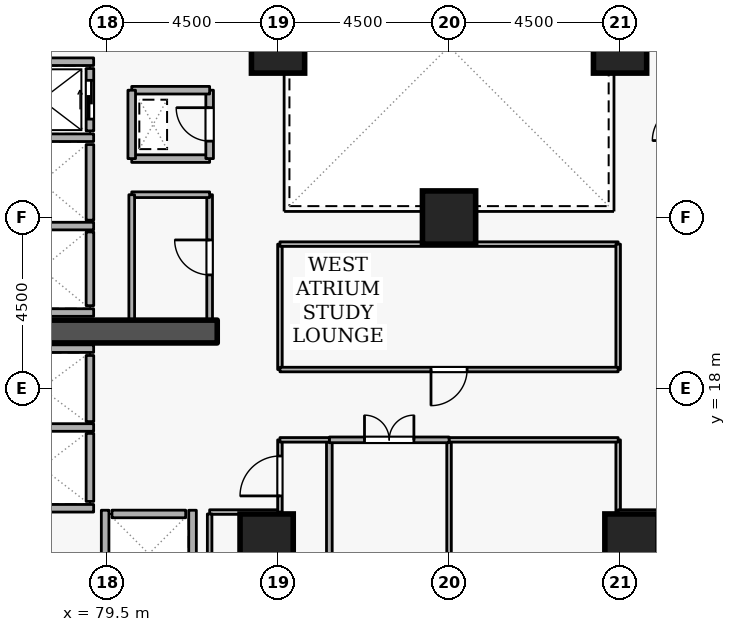
"""IFC4 building model, lengths in metres.
Left out: names, types, materials, properties, quantities, classifications, styles, units other than length and angle.
Written with IfcOpenShell. Run it as: python <this file> out.ifc"""

import sys

from ifc_helpers import new_model, si_unit, direction, frame, frame_2d, origin, origin_2d, place, context, subcontext, project, spatial, rectangle, extrude, element, fill, save


model = new_model("IFC4")
c1 = context("Model", 3, precision=1e-05, world=origin(), true_north=direction((0.0, 1.0)))
c2 = subcontext(c1, "Body", "Model", "MODEL_VIEW")
j1 = project(units=[si_unit("LENGTHUNIT", "METRE"), si_unit("PLANEANGLEUNIT", "RADIAN")], contexts=[c1])
p1 = place(None, origin())
s1 = spatial("IfcSite", under=j1, at=p1, CompositionType="ELEMENT")
p2 = place(p1, origin())
s2 = spatial("IfcBuilding", under=s1, at=p2, CompositionType="ELEMENT")
p3 = place(p2, frame((0.0, 0.0, 42.3)))
s3 = spatial("IfcBuildingStorey", under=s2, at=p3, CompositionType="ELEMENT", Elevation=42.3)
p4 = place(p3, frame((76.7, 19.5, 0.0), z_axis=(0.0, 0.0, 1.0), x_axis=(1.0, 0.0, 0.0)))
e1 = element("IfcWall", 1, at=p4, inside=s3, PredefinedType="SHEAR", context=c2, shape_type="SweptSolid", body=[
    extrude(rectangle(XDim=5.7, YDim=0.6, at=frame_2d((2.85, 0.0))), origin(), (0.0, 0.0, 1.0), 3.6),
])
for number, where, z_axis, x_axis in (
    (2, (93.3, 14.0, 0.0), (0.0, 0.0, 1.0), (1.0, 0.0, 0.0)),
    (3, (83.7, 14.0, 0.0), (0.0, 0.0, 1.0), (1.0, 0.0, 0.0)),
    (4, (93.0, 27.0, 0.0), (0.0, 0.0, 1.0), (1.0, 0.0, 0.0)),
    (5, (84.0, 27.0, 0.0), (0.0, 0.0, 1.0), (1.0, 0.0, 0.0)),
    (6, (88.5, 22.5, 0.0), (0.0, 0.0, 1.0), (1.0, 0.0, 0.0)),
):
    element("IfcColumn", number, at=place(p3, frame(where, z_axis=z_axis, x_axis=x_axis)), inside=s3, PredefinedType="COLUMN", context=c2, shape_type="SweptSolid", body=[
        extrude(rectangle(XDim=1.4, YDim=1.4, at=origin_2d()), origin(), (0.0, 0.0, 1.0), 3.6),
    ])
p5 = place(p3, frame((79.05, 24.78, 0.0), z_axis=(0.0, 0.0, 1.0), x_axis=(0.0, 1.0, 0.0)))
e7 = element("IfcWall", 7, at=p5, inside=s3, PredefinedType="STANDARD", context=c2, shape_type="SweptSolid", body=[
    extrude(rectangle(XDim=1.64, YDim=0.2, at=frame_2d((0.82, 0.0))), origin(), (0.0, 0.0, 1.0), 3.34),
])
p6 = place(p5, frame((0.31, 0.0, 0.0)))
e8 = element("IfcOpeningElement", 8, at=p6, cuts=e7, PredefinedType="OPENING", context=c2, shape_type="SweptSolid", body=[
    extrude(rectangle(XDim=1.02, YDim=2.06, at=frame_2d((0.51, 1.03))), frame((0.0, 0.11, 0.0), z_axis=(0.0, -1.0, 0.0), x_axis=(1.0, 0.0, 0.0)), (0.0, 0.0, 1.0), 0.22),
])
p7 = place(p3, frame((79.05, 22.43, 0.0), z_axis=(0.0, 0.0, 1.0), x_axis=(0.0, 1.0, 0.0)))
e9 = element("IfcWall", 9, at=p7, inside=s3, PredefinedType="STANDARD", context=c2, shape_type="SweptSolid", body=[
    extrude(rectangle(XDim=1.99, YDim=0.2, at=frame_2d((0.995, 0.0))), origin(), (0.0, 0.0, 1.0), 3.34),
])
p8 = place(p3, frame((79.05, 20.18, 0.0), z_axis=(0.0, 0.0, 1.0), x_axis=(0.0, 1.0, 0.0)))
e10 = element("IfcWall", 10, at=p8, inside=s3, PredefinedType="STANDARD", context=c2, shape_type="SweptSolid", body=[
    extrude(rectangle(XDim=1.94, YDim=0.2, at=frame_2d((0.97, 0.0))), origin(), (0.0, 0.0, 1.0), 3.34),
])
p9 = place(p3, frame((79.05, 17.13, 0.0), z_axis=(0.0, 0.0, 1.0), x_axis=(0.0, 1.0, 0.0)))
e11 = element("IfcWall", 11, at=p9, inside=s3, PredefinedType="STANDARD", context=c2, shape_type="SweptSolid", body=[
    extrude(rectangle(XDim=1.74, YDim=0.2, at=frame_2d((0.87, 0.0))), origin(), (0.0, 0.0, 1.0), 3.34),
])
p10 = place(p3, frame((79.05, 15.03, 0.0), z_axis=(0.0, 0.0, 1.0), x_axis=(0.0, 1.0, 0.0)))
e12 = element("IfcWall", 12, at=p10, inside=s3, PredefinedType="STANDARD", context=c2, shape_type="SweptSolid", body=[
    extrude(rectangle(XDim=1.79, YDim=0.2, at=frame_2d((0.895, 0.0))), origin(), (0.0, 0.0, 1.0), 3.34),
])
p11 = place(p3, frame((79.63, 14.7, 0.0), z_axis=(0.0, 0.0, 1.0), x_axis=(1.0, 0.0, 0.0)))
e13 = element("IfcWall", 13, at=p11, inside=s3, PredefinedType="STANDARD", context=c2, shape_type="SweptSolid", body=[
    extrude(rectangle(XDim=1.94, YDim=0.2, at=frame_2d((0.97, 0.0))), origin(), (0.0, 0.0, 1.0), 3.34),
])
for number, where, z_axis, x_axis in (
    (14, (76.712, 26.6, 0.0), (0.0, 0.0, 1.0), (1.0, 0.0, 0.0)),
    (15, (76.712, 24.6, 0.0), (0.0, 0.0, 1.0), (1.0, 0.0, 0.0)),
    (16, (76.712, 22.275, 0.0), (0.0, 0.0, 1.0), (1.0, 0.0, 0.0)),
    (17, (76.712, 20.0, 0.0), (0.0, 0.0, 1.0), (1.0, 0.0, 0.0)),
):
    element("IfcWall", number, at=place(p3, frame(where, z_axis=z_axis, x_axis=x_axis)), inside=s3, PredefinedType="STANDARD", context=c2, shape_type="SweptSolid", body=[
        extrude(rectangle(XDim=2.436, YDim=0.2, at=frame_2d((1.218, 0.0))), origin(), (0.0, 0.0, 1.0), 3.34),
    ])
p12 = place(p3, frame((76.402, 19.05, 0.0), z_axis=(0.0, 0.0, 1.0), x_axis=(1.0, 0.0, 0.0)))
e18 = element("IfcWall", 18, at=p12, inside=s3, PredefinedType="STANDARD", context=c2, shape_type="SweptSolid", body=[
    extrude(rectangle(XDim=2.746, YDim=0.2, at=frame_2d((1.373, 0.0))), origin(), (0.0, 0.0, 1.0), 2.545),
])
p13 = place(p3, frame((76.402, 16.975, 0.0), z_axis=(0.0, 0.0, 1.0), x_axis=(1.0, 0.0, 0.0)))
e19 = element("IfcWall", 19, at=p13, inside=s3, PredefinedType="STANDARD", context=c2, shape_type="SweptSolid", body=[
    extrude(rectangle(XDim=2.746, YDim=0.2, at=frame_2d((1.373, 0.0))), origin(), (0.0, 0.0, 1.0), 3.34),
])
p14 = place(p3, frame((76.512, 14.85, 0.0), z_axis=(0.0, 0.0, 1.0), x_axis=(1.0, 0.0, 0.0)))
e20 = element("IfcWall", 20, at=p14, inside=s3, PredefinedType="STANDARD", context=c2, shape_type="SweptSolid", body=[
    extrude(rectangle(XDim=2.636, YDim=0.2, at=frame_2d((1.318, 0.0))), origin(), (0.0, 0.0, 1.0), 3.34),
])
for number, where, z_axis, x_axis in (
    (21, (81.75, 12.612, 0.0), (0.0, 0.0, 1.0), (0.0, 1.0, 0.0)),
    (22, (79.45, 12.612, 0.0), (0.0, 0.0, 1.0), (0.0, 1.0, 0.0)),
):
    element("IfcWall", number, at=place(p3, frame(where, z_axis=z_axis, x_axis=x_axis)), inside=s3, PredefinedType="STANDARD", context=c2, shape_type="SweptSolid", body=[
        extrude(rectangle(XDim=2.186, YDim=0.2, at=frame_2d((1.093, 0.0))), origin(), (0.0, 0.0, 1.0), 3.34),
    ])
p15 = place(p3, frame((80.15, 24.05, 0.0), z_axis=(0.0, 0.0, 1.0), x_axis=(1.0, 0.0, 0.0)))
e23 = element("IfcWall", 23, at=p15, inside=s3, PredefinedType="STANDARD", context=c2, shape_type="SweptSolid", body=[
    extrude(rectangle(XDim=2.05, YDim=0.2, at=frame_2d((1.025, 0.0))), origin(), (0.0, 0.0, 1.0), 3.34),
])
p16 = place(p3, frame((82.2, 24.05, 0.0), z_axis=(0.0, 0.0, 1.0), x_axis=(0.0, 1.0, 0.0)))
e24 = element("IfcWall", 24, at=p16, inside=s3, PredefinedType="STANDARD", context=c2, shape_type="SweptSolid", body=[
    extrude(rectangle(XDim=1.8, YDim=0.2, at=frame_2d((0.9, 0.0))), origin(), (0.0, 0.0, 1.0), 3.34),
])
p17 = place(p16, frame((0.46, 0.0, 0.0)))
e25 = element("IfcOpeningElement", 25, at=p17, cuts=e24, PredefinedType="OPENING", context=c2, shape_type="SweptSolid", body=[
    extrude(rectangle(XDim=0.88, YDim=2.04, at=frame_2d((0.44, 1.02))), frame((0.0, 0.11, 0.0), z_axis=(0.0, -1.0, 0.0), x_axis=(1.0, 0.0, 0.0)), (0.0, 0.0, 1.0), 0.22),
])
p18 = place(p3, frame((82.2, 25.85, 0.0), z_axis=(0.0, 0.0, 1.0), x_axis=(-1.0, 0.0, 0.0)))
e26 = element("IfcWall", 26, at=p18, inside=s3, PredefinedType="STANDARD", context=c2, shape_type="SweptSolid", body=[
    extrude(rectangle(XDim=2.05, YDim=0.2, at=frame_2d((1.025, 0.0))), origin(), (0.0, 0.0, 1.0), 3.34),
])
p19 = place(p3, frame((80.15, 25.85, 0.0), z_axis=(0.0, 0.0, 1.0), x_axis=(0.0, -1.0, 0.0)))
e27 = element("IfcWall", 27, at=p19, inside=s3, PredefinedType="STANDARD", context=c2, shape_type="SweptSolid", body=[
    extrude(rectangle(XDim=1.8, YDim=0.2, at=frame_2d((0.9, 0.0))), origin(), (0.0, 0.0, 1.0), 3.34),
])
p20 = place(p3, frame((82.2, 19.8, 0.0), z_axis=(0.0, 0.0, 1.0), x_axis=(0.0, 1.0, 0.0)))
e28 = element("IfcWall", 28, at=p20, inside=s3, PredefinedType="PARTITIONING", context=c2, shape_type="SweptSolid", body=[
    extrude(rectangle(XDim=3.3, YDim=0.15, at=frame_2d((1.65, 0.0))), origin(), (0.0, 0.0, 1.0), 3.34),
])
p21 = place(p20, frame((1.19, 0.0, 0.0)))
e29 = element("IfcOpeningElement", 29, at=p21, cuts=e28, PredefinedType="OPENING", context=c2, shape_type="SweptSolid", body=[
    extrude(rectangle(XDim=0.92, YDim=2.08, at=frame_2d((0.46, 1.04))), frame((0.0, 0.085, 0.0), z_axis=(0.0, -1.0, 0.0), x_axis=(1.0, 0.0, 0.0)), (0.0, 0.0, 1.0), 0.17),
])
p22 = place(p3, frame((82.2, 23.1, 0.0), z_axis=(0.0, 0.0, 1.0), x_axis=(-1.0, 0.0, 0.0)))
e30 = element("IfcWall", 30, at=p22, inside=s3, PredefinedType="PARTITIONING", context=c2, shape_type="SweptSolid", body=[
    extrude(rectangle(XDim=2.05, YDim=0.15, at=frame_2d((1.025, 0.0))), origin(), (0.0, 0.0, 1.0), 3.34),
])
p23 = place(p3, frame((80.15, 23.1, 0.0), z_axis=(0.0, 0.0, 1.0), x_axis=(0.0, -1.0, 0.0)))
e31 = element("IfcWall", 31, at=p23, inside=s3, PredefinedType="PARTITIONING", context=c2, shape_type="SweptSolid", body=[
    extrude(rectangle(XDim=3.3, YDim=0.15, at=frame_2d((1.65, 0.0))), origin(), (0.0, 0.0, 1.0), 3.34),
])
p24 = place(p3, frame((92.95, 16.65, 0.0), z_axis=(0.0, 0.0, 1.0), x_axis=(0.0, -1.0, 0.0)))
e32 = element("IfcWall", 32, at=p24, inside=s3, PredefinedType="PARTITIONING", context=c2, shape_type="SweptSolid", body=[
    extrude(rectangle(XDim=1.9, YDim=0.12, at=frame_2d((0.95, 0.0))), origin(), (0.0, 0.0, 1.0), 3.34),
])
p25 = place(p3, frame((92.95, 14.75, 0.0), z_axis=(0.0, 0.0, 1.0), x_axis=(1.0, 0.0, 0.0)))
e33 = element("IfcWall", 33, at=p25, inside=s3, PredefinedType="PARTITIONING", context=c2, shape_type="SweptSolid", body=[
    extrude(rectangle(XDim=1.85, YDim=0.12, at=frame_2d((0.925, 0.0))), origin(), (0.0, 0.0, 1.0), 3.34),
])
p26 = place(p3, frame((88.5, 2.78, 0.0), z_axis=(0.0, 0.0, 1.0), x_axis=(0.0, 1.0, 0.0)))
e34 = element("IfcWall", 34, at=p26, inside=s3, PredefinedType="PARTITIONING", context=c2, shape_type="SweptSolid", body=[
    extrude(rectangle(XDim=13.87, YDim=0.12, at=frame_2d((6.935, 0.0))), origin(), (0.0, 0.0, 1.0), 2.882),
])
p27 = place(p3, frame((88.5, 16.65, 0.0), z_axis=(0.0, 0.0, 1.0), x_axis=(1.0, 0.0, 0.0)))
e35 = element("IfcWall", 35, at=p27, inside=s3, PredefinedType="PARTITIONING", context=c2, shape_type="SweptSolid", body=[
    extrude(rectangle(XDim=4.45, YDim=0.12, at=frame_2d((2.225, 0.0))), origin(), (0.0, 0.0, 1.0), 3.34),
])
p28 = place(p3, frame((85.35, 2.78, 0.0), z_axis=(0.0, 0.0, 1.0), x_axis=(0.0, 1.0, 0.0)))
e36 = element("IfcWall", 36, at=p28, inside=s3, PredefinedType="PARTITIONING", context=c2, shape_type="SweptSolid", body=[
    extrude(rectangle(XDim=13.87, YDim=0.15, at=frame_2d((6.935, 0.0))), origin(), (0.0, 0.0, 1.0), 3.34),
])
p29 = place(p3, frame((85.35, 16.65, 0.0), z_axis=(0.0, 0.0, 1.0), x_axis=(1.0, 0.0, 0.0)))
e37 = element("IfcWall", 37, at=p29, inside=s3, PredefinedType="PARTITIONING", context=c2, shape_type="SweptSolid", body=[
    extrude(rectangle(XDim=3.15, YDim=0.15, at=frame_2d((1.575, 0.0))), origin(), (0.0, 0.0, 1.0), 3.34),
])
p30 = place(p29, frame((0.925, 0.0, 0.0)))
e38 = element("IfcOpeningElement", 38, at=p30, cuts=e37, PredefinedType="OPENING", context=c2, shape_type="SweptSolid", body=[
    extrude(rectangle(XDim=1.3, YDim=2.12, at=frame_2d((0.65, 1.06))), frame((0.0, 0.085, 0.0), z_axis=(0.0, -1.0, 0.0), x_axis=(1.0, 0.0, 0.0)), (0.0, 0.0, 1.0), 0.17),
])
p31 = place(p3, frame((82.2, 14.75, 0.0), z_axis=(0.0, 0.0, 1.0), x_axis=(1.0, 0.0, 0.0)))
e39 = element("IfcWall", 39, at=p31, inside=s3, PredefinedType="PARTITIONING", context=c2, shape_type="SweptSolid", body=[
    extrude(rectangle(XDim=1.85, YDim=0.12, at=frame_2d((0.925, 0.0))), origin(), (0.0, 0.0, 1.0), 3.34),
])
p32 = place(p3, frame((84.05, 14.75, 0.0), z_axis=(0.0, 0.0, 1.0), x_axis=(0.0, 1.0, 0.0)))
e40 = element("IfcWall", 40, at=p32, inside=s3, PredefinedType="PARTITIONING", context=c2, shape_type="SweptSolid", body=[
    extrude(rectangle(XDim=1.9, YDim=0.12, at=frame_2d((0.95, 0.0))), origin(), (0.0, 0.0, 1.0), 3.34),
])
p33 = place(p32, frame((0.425, 0.0, 0.0)))
e41 = element("IfcOpeningElement", 41, at=p33, cuts=e40, PredefinedType="OPENING", context=c2, shape_type="SweptSolid", body=[
    extrude(rectangle(XDim=1.05, YDim=2.1, at=frame_2d((0.525, 1.05))), frame((0.0, 0.07, 0.0), z_axis=(0.0, -1.0, 0.0), x_axis=(1.0, 0.0, 0.0)), (0.0, 0.0, 1.0), 0.14),
])
p34 = place(p3, frame((84.05, 16.65, 0.0), z_axis=(0.0, 0.0, 1.0), x_axis=(1.0, 0.0, 0.0)))
e42 = element("IfcWall", 42, at=p34, inside=s3, PredefinedType="PARTITIONING", context=c2, shape_type="SweptSolid", body=[
    extrude(rectangle(XDim=1.3, YDim=0.12, at=frame_2d((0.65, 0.0))), origin(), (0.0, 0.0, 1.0), 3.34),
])
p35 = place(p3, frame((82.2, 12.4, 0.0), z_axis=(0.0, 0.0, 1.0), x_axis=(0.0, 1.0, 0.0)))
e43 = element("IfcWall", 43, at=p35, inside=s3, PredefinedType="PARTITIONING", context=c2, shape_type="SweptSolid", body=[
    extrude(rectangle(XDim=2.3, YDim=0.12, at=frame_2d((1.15, 0.0))), origin(), (0.0, 0.0, 1.0), 3.34),
])
p36 = place(p3, frame((84.05, 18.5, 0.0), z_axis=(0.0, 0.0, 1.0), x_axis=(0.0, 1.0, 0.0)))
e44 = element("IfcWall", 44, at=p36, inside=s3, PredefinedType="PARTITIONING", context=c2, shape_type="SweptSolid", body=[
    extrude(rectangle(XDim=3.3, YDim=0.12, at=frame_2d((1.65, 0.0))), origin(), (0.0, 0.0, 1.0), 3.34),
])
p37 = place(p3, frame((84.05, 21.8, 0.0), z_axis=(0.0, 0.0, 1.0), x_axis=(1.0, 0.0, 0.0)))
e45 = element("IfcWall", 45, at=p37, inside=s3, PredefinedType="PARTITIONING", context=c2, shape_type="SweptSolid", body=[
    extrude(rectangle(XDim=8.9, YDim=0.12, at=frame_2d((4.45, 0.0))), origin(), (0.0, 0.0, 1.0), 3.34),
])
p38 = place(p3, frame((92.95, 21.8, 0.0), z_axis=(0.0, 0.0, 1.0), x_axis=(0.0, -1.0, 0.0)))
e46 = element("IfcWall", 46, at=p38, inside=s3, PredefinedType="PARTITIONING", context=c2, shape_type="SweptSolid", body=[
    extrude(rectangle(XDim=3.3, YDim=0.12, at=frame_2d((1.65, 0.0))), origin(), (0.0, 0.0, 1.0), 3.34),
])
p39 = place(p3, frame((92.95, 18.5, 0.0), z_axis=(0.0, 0.0, 1.0), x_axis=(-1.0, 0.0, 0.0)))
e47 = element("IfcWall", 47, at=p39, inside=s3, PredefinedType="PARTITIONING", context=c2, shape_type="SweptSolid", body=[
    extrude(rectangle(XDim=8.9, YDim=0.12, at=frame_2d((4.45, 0.0))), origin(), (0.0, 0.0, 1.0), 3.34),
])
p40 = place(p39, frame((3.975, 0.0, 0.0)))
e48 = element("IfcOpeningElement", 48, at=p40, cuts=e47, PredefinedType="OPENING", context=c2, shape_type="SweptSolid", body=[
    extrude(rectangle(XDim=0.95, YDim=2.1, at=frame_2d((0.475, 1.05))), frame((0.0, 0.07, 0.0), z_axis=(0.0, -1.0, 0.0), x_axis=(1.0, 0.0, 0.0)), (0.0, 0.0, 1.0), 0.14),
])
p41 = place(p6, origin())
e49 = element("IfcDoor", 49, at=p41, inside=s3, OperationType="SLIDING_TO_LEFT", PredefinedType="DOOR", context=c2, shape_type="SweptSolid", body=[
    extrude(rectangle(XDim=1.02, YDim=2.06, at=frame_2d((0.51, 1.03))), frame((0.0, 0.025, 0.0), z_axis=(0.0, -1.0, 0.0), x_axis=(1.0, 0.0, 0.0)), (0.0, 0.0, 1.0), 0.05),
])
fill(e8, e49)
p42 = place(p17, origin())
e50 = element("IfcDoor", 50, at=p42, inside=s3, OperationType="SINGLE_SWING_RIGHT", PredefinedType="DOOR", context=c2, shape_type="SweptSolid", body=[
    extrude(rectangle(XDim=0.88, YDim=2.04, at=frame_2d((0.44, 1.02))), frame((0.0, 0.025, 0.0), z_axis=(0.0, -1.0, 0.0), x_axis=(1.0, 0.0, 0.0)), (0.0, 0.0, 1.0), 0.05),
])
fill(e25, e50)
p43 = place(p21, origin())
e51 = element("IfcDoor", 51, at=p43, inside=s3, OperationType="SINGLE_SWING_RIGHT", PredefinedType="DOOR", context=c2, shape_type="SweptSolid", body=[
    extrude(rectangle(XDim=0.92, YDim=2.08, at=frame_2d((0.46, 1.04))), frame((0.0, 0.025, 0.0), z_axis=(0.0, -1.0, 0.0), x_axis=(1.0, 0.0, 0.0)), (0.0, 0.0, 1.0), 0.05),
])
fill(e29, e51)
p44 = place(p30, origin())
e52 = element("IfcDoor", 52, at=p44, inside=s3, OperationType="DOUBLE_DOOR_SINGLE_SWING", PredefinedType="DOOR", context=c2, shape_type="SweptSolid", body=[
    extrude(rectangle(XDim=1.3, YDim=2.12, at=frame_2d((0.65, 1.06))), frame((0.0, 0.025, 0.0), z_axis=(0.0, -1.0, 0.0), x_axis=(1.0, 0.0, 0.0)), (0.0, 0.0, 1.0), 0.05),
])
fill(e38, e52)
p45 = place(p33, origin())
e53 = element("IfcDoor", 53, at=p45, inside=s3, OperationType="SINGLE_SWING_LEFT", PredefinedType="DOOR", context=c2, shape_type="SweptSolid", body=[
    extrude(rectangle(XDim=1.05, YDim=2.1, at=frame_2d((0.525, 1.05))), frame((0.0, 0.025, 0.0), z_axis=(0.0, -1.0, 0.0), x_axis=(1.0, 0.0, 0.0)), (0.0, 0.0, 1.0), 0.05),
])
fill(e41, e53)
p46 = place(p40, origin())
e54 = element("IfcDoor", 54, at=p46, inside=s3, OperationType="SINGLE_SWING_RIGHT", PredefinedType="DOOR", context=c2, shape_type="SweptSolid", body=[
    extrude(rectangle(XDim=0.95, YDim=2.1, at=frame_2d((0.475, 1.05))), frame((0.0, 0.025, 0.0), z_axis=(0.0, -1.0, 0.0), x_axis=(1.0, 0.0, 0.0)), (0.0, 0.0, 1.0), 0.05),
])
fill(e48, e54)
save(model, sys.argv[1])
